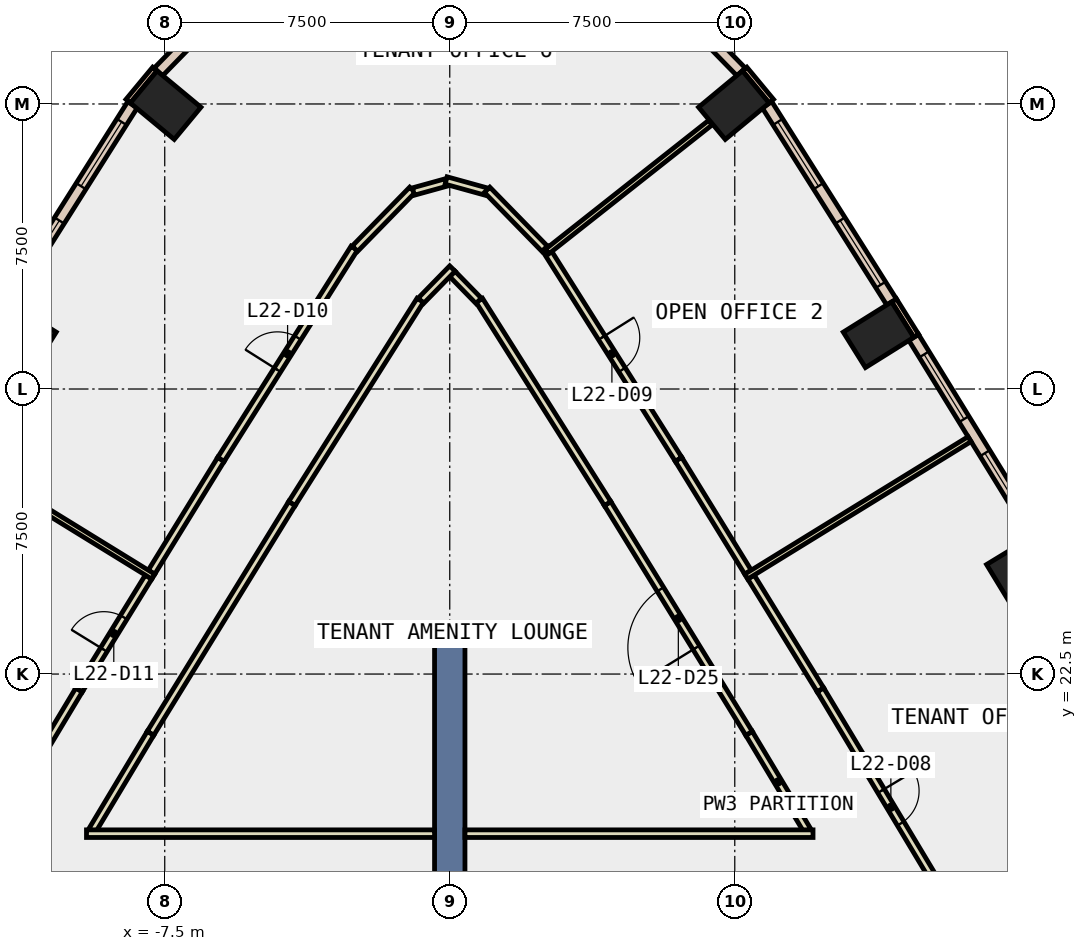
"""IFC4 building model, lengths in metres.
Left out: names, types, materials, properties, quantities, classifications, styles, units other than length and angle.
Written with IfcOpenShell. Run it as: python <this file> out.ifc"""

import sys

from ifc_helpers import new_model, si_unit, direction, frame, frame_2d, origin, origin_2d, place, context, subcontext, project, spatial, rectangle, extrude, element, fill, save


model = new_model("IFC4")
c1 = context("Model", 3, precision=1e-05, world=origin(), true_north=direction((0.0, 1.0)))
c2 = subcontext(c1, "Body", "Model", "MODEL_VIEW")
j1 = project(units=[si_unit("LENGTHUNIT", "METRE"), si_unit("PLANEANGLEUNIT", "RADIAN")], contexts=[c1])
p1 = place(None, origin())
s1 = spatial("IfcSite", under=j1, at=p1, CompositionType="ELEMENT")
p2 = place(p1, origin())
s2 = spatial("IfcBuilding", under=s1, at=p2, CompositionType="ELEMENT")
p3 = place(p2, frame((0.0, 0.0, 103.4)))
s3 = spatial("IfcBuildingStorey", under=s2, at=p3, CompositionType="ELEMENT", Elevation=103.4)
for number, where, z_axis, x_axis in (
    (1, (15.053, 25.302, -0.4), (0.0, 0.0, 1.0), (-0.52, 0.854, 0.0)),
    (2, (11.283, 31.428, -0.4), (0.0, 0.0, 1.0), (-0.53, 0.848, 0.0)),
    (3, (7.476, 37.47, -0.4), (0.0, 0.0, 1.0), (-0.638, 0.77, 0.0)),
    (4, (-7.476, 37.47, -0.4), (0.0, 0.0, 1.0), (0.638, 0.77, 0.0)),
    (5, (-11.283, 31.428, -0.4), (0.0, 0.0, 1.0), (0.53, 0.848, 0.0)),
):
    element("IfcColumn", number, at=place(p3, frame(where, z_axis=z_axis, x_axis=x_axis)), inside=s3, PredefinedType="COLUMN", context=c2, shape_type="SweptSolid", body=[
        extrude(rectangle(XDim=1.1, YDim=1.5, at=origin_2d()), origin(), (0.0, 0.0, 1.0), 4.2),
    ])
p4 = place(p3, frame((0.0, 14.5, -0.4), z_axis=(0.0, 0.0, 1.0), x_axis=(0.0, 1.0, 0.0)))
e6 = element("IfcWall", 6, at=p4, inside=s3, PredefinedType="SHEAR", context=c2, shape_type="SweptSolid", body=[
    extrude(rectangle(XDim=9.0, YDim=0.8, at=frame_2d((4.5, 0.0))), origin(), (0.0, 0.0, 1.0), 4.2),
])
p5 = place(p3, frame((12.274, 31.399, 0.0), z_axis=(0.0, 0.0, 1.0), x_axis=(-0.529879262372, 0.848073090782, 0.0)))
e7 = element("IfcWall", 7, at=p5, inside=s3, PredefinedType="STANDARD", context=c2, shape_type="SweptSolid", body=[
    extrude(rectangle(XDim=1.1, YDim=0.15, at=frame_2d((0.55, 0.0))), origin(), (0.0, 0.0, 1.0), 3.8),
])
for number, where, z_axis, x_axis in (
    (8, (8.462, 37.574, 0.0), (0.0, 0.0, 1.0), (-0.639, 0.77, 0.0)),
    (9, (-7.76, 38.42, 0.0), (0.0, 0.0, 1.0), (-0.639, -0.77, 0.0)),
):
    element("IfcWall", number, at=place(p3, frame(where, z_axis=z_axis, x_axis=x_axis)), inside=s3, PredefinedType="STANDARD", context=c2, shape_type="SweptSolid", body=[
        extrude(rectangle(XDim=1.099, YDim=0.15, at=frame_2d((0.55, 0.0))), origin(), (0.0, 0.0, 1.0), 3.8),
    ])
p6 = place(p3, frame((15.406, 26.16, 0.0), z_axis=(0.0, 0.0, 1.0), x_axis=(-0.524121974895, 0.851643208998, 0.0)))
e10 = element("IfcWall", 10, at=p6, inside=s3, PredefinedType="STANDARD", context=c2, shape_type="SweptSolid", body=[
    extrude(rectangle(XDim=6.104, YDim=0.3, at=frame_2d((3.052, 0.0))), origin(), (0.0, 0.0, 1.0), 3.8),
])
p7 = place(p6, frame((0.526, 0.0, 0.9)))
e11 = element("IfcOpeningElement", 11, at=p7, cuts=e10, PredefinedType="OPENING", context=c2, shape_type="SweptSolid", body=[
    extrude(rectangle(XDim=2.0, YDim=2.6, at=frame_2d((1.0, 1.3))), frame((0.0, 0.16, 0.0), z_axis=(0.0, -1.0, 0.0), x_axis=(1.0, 0.0, 0.0)), (0.0, 0.0, 1.0), 0.32),
])
p8 = place(p6, frame((3.578, 0.0, 0.9)))
e12 = element("IfcOpeningElement", 12, at=p8, cuts=e10, PredefinedType="OPENING", context=c2, shape_type="SweptSolid", body=[
    extrude(rectangle(XDim=2.0, YDim=2.6, at=frame_2d((1.0, 1.3))), frame((0.0, 0.16, 0.0), z_axis=(0.0, -1.0, 0.0), x_axis=(1.0, 0.0, 0.0)), (0.0, 0.0, 1.0), 0.32),
])
p9 = place(p3, frame((11.626, 32.29, 0.0), z_axis=(0.0, 0.0, 1.0), x_axis=(-0.534018429465, 0.845472836342, 0.0)))
e13 = element("IfcWall", 13, at=p9, inside=s3, PredefinedType="STANDARD", context=c2, shape_type="SweptSolid", body=[
    extrude(rectangle(XDim=6.138, YDim=0.3, at=frame_2d((3.069, 0.0))), origin(), (0.0, 0.0, 1.0), 3.8),
])
p10 = place(p9, frame((0.535, 0.0, 0.9)))
e14 = element("IfcOpeningElement", 14, at=p10, cuts=e13, PredefinedType="OPENING", context=c2, shape_type="SweptSolid", body=[
    extrude(rectangle(XDim=2.0, YDim=2.6, at=frame_2d((1.0, 1.3))), frame((0.0, 0.16, 0.0), z_axis=(0.0, -1.0, 0.0), x_axis=(1.0, 0.0, 0.0)), (0.0, 0.0, 1.0), 0.32),
])
p11 = place(p9, frame((3.604, 0.0, 0.9)))
e15 = element("IfcOpeningElement", 15, at=p11, cuts=e13, PredefinedType="OPENING", context=c2, shape_type="SweptSolid", body=[
    extrude(rectangle(XDim=2.0, YDim=2.6, at=frame_2d((1.0, 1.3))), frame((0.0, 0.16, 0.0), z_axis=(0.0, -1.0, 0.0), x_axis=(1.0, 0.0, 0.0)), (0.0, 0.0, 1.0), 0.32),
])
p12 = place(p3, frame((7.668, 38.343, 0.0), z_axis=(0.0, 0.0, 1.0), x_axis=(-0.698695735804, 0.715418946331, 0.0)))
e16 = element("IfcWall", 16, at=p12, inside=s3, PredefinedType="STANDARD", context=c2, shape_type="SweptSolid", body=[
    extrude(rectangle(XDim=3.65, YDim=0.3, at=frame_2d((1.825, 0.0))), origin(), (0.0, 0.0, 1.0), 3.8),
])
p13 = place(p12, frame((1.125, 0.0, 0.9)))
e17 = element("IfcOpeningElement", 17, at=p13, cuts=e16, PredefinedType="OPENING", context=c2, shape_type="SweptSolid", body=[
    extrude(rectangle(XDim=1.4, YDim=2.6, at=frame_2d((0.7, 1.3))), frame((0.0, 0.16, 0.0), z_axis=(0.0, -1.0, 0.0), x_axis=(1.0, 0.0, 0.0)), (0.0, 0.0, 1.0), 0.32),
])
p14 = place(p3, frame((-5.118, 40.954, 0.0), z_axis=(0.0, 0.0, 1.0), x_axis=(-0.698695735804, -0.715418946331, 0.0)))
e18 = element("IfcWall", 18, at=p14, inside=s3, PredefinedType="STANDARD", context=c2, shape_type="SweptSolid", body=[
    extrude(rectangle(XDim=3.65, YDim=0.3, at=frame_2d((1.825, 0.0))), origin(), (0.0, 0.0, 1.0), 3.8),
])
p15 = place(p14, frame((1.125, 0.0, 0.9)))
e19 = element("IfcOpeningElement", 19, at=p15, cuts=e18, PredefinedType="OPENING", context=c2, shape_type="SweptSolid", body=[
    extrude(rectangle(XDim=1.4, YDim=2.6, at=frame_2d((0.7, 1.3))), frame((0.0, 0.16, 0.0), z_axis=(0.0, -1.0, 0.0), x_axis=(1.0, 0.0, 0.0)), (0.0, 0.0, 1.0), 0.32),
])
p16 = place(p3, frame((-8.348, 37.48, 0.0), z_axis=(0.0, 0.0, 1.0), x_axis=(-0.534018429465, -0.845472836342, 0.0)))
e20 = element("IfcWall", 20, at=p16, inside=s3, PredefinedType="STANDARD", context=c2, shape_type="SweptSolid", body=[
    extrude(rectangle(XDim=6.138, YDim=0.3, at=frame_2d((3.069, 0.0))), origin(), (0.0, 0.0, 1.0), 3.8),
])
p17 = place(p16, frame((0.535, 0.0, 0.9)))
e21 = element("IfcOpeningElement", 21, at=p17, cuts=e20, PredefinedType="OPENING", context=c2, shape_type="SweptSolid", body=[
    extrude(rectangle(XDim=2.0, YDim=2.6, at=frame_2d((1.0, 1.3))), frame((0.0, 0.16, 0.0), z_axis=(0.0, -1.0, 0.0), x_axis=(1.0, 0.0, 0.0)), (0.0, 0.0, 1.0), 0.32),
])
p18 = place(p16, frame((3.604, 0.0, 0.9)))
e22 = element("IfcOpeningElement", 22, at=p18, cuts=e20, PredefinedType="OPENING", context=c2, shape_type="SweptSolid", body=[
    extrude(rectangle(XDim=2.0, YDim=2.6, at=frame_2d((1.0, 1.3))), frame((0.0, 0.16, 0.0), z_axis=(0.0, -1.0, 0.0), x_axis=(1.0, 0.0, 0.0)), (0.0, 0.0, 1.0), 0.32),
])
p19 = place(p3, frame((9.407, 18.386, 0.0), z_axis=(0.0, 0.0, 1.0), x_axis=(-0.514399309837, 0.857550785691, 0.0)))
e23 = element("IfcWall", 23, at=p19, inside=s3, PredefinedType="PARTITIONING", context=c2, shape_type="SweptSolid", body=[
    extrude(rectangle(XDim=2.978, YDim=0.2, at=frame_2d((1.489, 0.0))), origin(), (0.0, 0.0, 1.0), 3.8),
])
p20 = place(p3, frame((7.875, 20.94, 0.0), z_axis=(0.0, 0.0, 1.0), x_axis=(-0.524183774504, 0.851605172921, 0.0)))
e24 = element("IfcWall", 24, at=p20, inside=s3, PredefinedType="PARTITIONING", context=c2, shape_type="SweptSolid", body=[
    extrude(rectangle(XDim=7.099, YDim=0.2, at=frame_2d((3.549, 0.0))), origin(), (0.0, 0.0, 1.0), 3.8),
])
p21 = place(p20, frame((2.649, 0.0, 0.0)))
e25 = element("IfcOpeningElement", 25, at=p21, cuts=e24, PredefinedType="OPENING", context=c2, shape_type="SweptSolid", body=[
    extrude(rectangle(XDim=1.8, YDim=2.1, at=frame_2d((0.9, 1.05))), frame((0.0, 0.11, 0.0), z_axis=(0.0, -1.0, 0.0), x_axis=(1.0, 0.0, 0.0)), (0.0, 0.0, 1.0), 0.22),
])
p22 = place(p3, frame((4.154, 26.985, 0.0), z_axis=(0.0, 0.0, 1.0), x_axis=(-0.53384777413, 0.84558060175, 0.0)))
e26 = element("IfcWall", 26, at=p22, inside=s3, PredefinedType="PARTITIONING", context=c2, shape_type="SweptSolid", body=[
    extrude(rectangle(XDim=6.326, YDim=0.2, at=frame_2d((3.163, 0.0))), origin(), (0.0, 0.0, 1.0), 3.8),
])
p23 = place(p3, frame((0.76, 32.321, 0.0), z_axis=(0.0, 0.0, 1.0), x_axis=(-0.698898447714, 0.715220916769, 0.0)))
e27 = element("IfcWall", 27, at=p23, inside=s3, PredefinedType="PARTITIONING", context=c2, shape_type="SweptSolid", body=[
    extrude(rectangle(XDim=0.987, YDim=0.2, at=frame_2d((0.494, 0.0))), origin(), (0.0, 0.0, 1.0), 3.8),
])
p24 = place(p3, frame((0.07, 33.17, 0.0), z_axis=(0.0, 0.0, 1.0), x_axis=(-0.699145664909, -0.714979257908, 0.0)))
e28 = element("IfcWall", 28, at=p24, inside=s3, PredefinedType="PARTITIONING", context=c2, shape_type="SweptSolid", body=[
    extrude(rectangle(XDim=1.187, YDim=0.2, at=frame_2d((0.594, 0.0))), origin(), (0.0, 0.0, 1.0), 3.8),
])
p25 = place(p3, frame((-0.777, 32.334, 0.0), z_axis=(0.0, 0.0, 1.0), x_axis=(-0.53384777413, -0.84558060175, 0.0)))
e29 = element("IfcWall", 29, at=p25, inside=s3, PredefinedType="PARTITIONING", context=c2, shape_type="SweptSolid", body=[
    extrude(rectangle(XDim=6.326, YDim=0.2, at=frame_2d((3.163, 0.0))), origin(), (0.0, 0.0, 1.0), 3.8),
])
p26 = place(p3, frame((-4.154, 26.985, 0.0), z_axis=(0.0, 0.0, 1.0), x_axis=(-0.524183774504, -0.851605172921, 0.0)))
e30 = element("IfcWall", 30, at=p26, inside=s3, PredefinedType="PARTITIONING", context=c2, shape_type="SweptSolid", body=[
    extrude(rectangle(XDim=7.099, YDim=0.2, at=frame_2d((3.549, 0.0))), origin(), (0.0, 0.0, 1.0), 3.8),
])
p27 = place(p3, frame((-7.875, 20.94, 0.0), z_axis=(0.0, 0.0, 1.0), x_axis=(-0.514399309837, -0.857550785691, 0.0)))
e31 = element("IfcWall", 31, at=p27, inside=s3, PredefinedType="PARTITIONING", context=c2, shape_type="SweptSolid", body=[
    extrude(rectangle(XDim=2.978, YDim=0.2, at=frame_2d((1.489, 0.0))), origin(), (0.0, 0.0, 1.0), 3.8),
])
p28 = place(p3, frame((7.927, 25.052, 0.0), z_axis=(0.0, 0.0, 1.0), x_axis=(0.524140390501, -0.851631875311, 0.0)))
e32 = element("IfcWall", 32, at=p28, inside=s3, PredefinedType="PARTITIONING", context=c2, shape_type="SweptSolid", body=[
    extrude(rectangle(XDim=3.487, YDim=0.2, at=frame_2d((1.744, 0.0))), origin(), (0.0, 0.0, 1.0), 3.8),
])
p29 = place(p3, frame((9.755, 22.082, 0.0), z_axis=(0.0, 0.0, 1.0), x_axis=(0.514582342012, -0.857440967816, 0.0)))
e33 = element("IfcWall", 33, at=p29, inside=s3, PredefinedType="PARTITIONING", context=c2, shape_type="SweptSolid", body=[
    extrude(rectangle(XDim=7.049, YDim=0.2, at=frame_2d((3.524, 0.0))), origin(), (0.0, 0.0, 1.0), 3.8),
])
p30 = place(p29, frame((3.1, 0.0, 0.0)))
e34 = element("IfcOpeningElement", 34, at=p30, cuts=e33, PredefinedType="OPENING", context=c2, shape_type="SweptSolid", body=[
    extrude(rectangle(XDim=1.0, YDim=2.1, at=frame_2d((0.5, 1.05))), frame((0.0, 0.11, 0.0), z_axis=(0.0, -1.0, 0.0), x_axis=(1.0, 0.0, 0.0)), (0.0, 0.0, 1.0), 0.22),
])
p31 = place(p3, frame((2.513, 33.705, 0.0), z_axis=(0.0, 0.0, 1.0), x_axis=(0.533874165031, -0.845563939577, 0.0)))
e35 = element("IfcWall", 35, at=p31, inside=s3, PredefinedType="PARTITIONING", context=c2, shape_type="SweptSolid", body=[
    extrude(rectangle(XDim=6.571, YDim=0.2, at=frame_2d((3.286, 0.0))), origin(), (0.0, 0.0, 1.0), 3.8),
])
p32 = place(p31, frame((2.785, 0.0, 0.0)))
e36 = element("IfcOpeningElement", 36, at=p32, cuts=e35, PredefinedType="OPENING", context=c2, shape_type="SweptSolid", body=[
    extrude(rectangle(XDim=1.0, YDim=2.1, at=frame_2d((0.5, 1.05))), frame((0.0, 0.11, 0.0), z_axis=(0.0, -1.0, 0.0), x_axis=(1.0, 0.0, 0.0)), (0.0, 0.0, 1.0), 0.22),
])
for number, where, z_axis, x_axis in (
    (37, (6.021, 28.149, 0.0), (0.0, 0.0, 1.0), (0.524, -0.852, 0.0)),
    (38, (-7.848, 25.18, 0.0), (0.0, 0.0, 1.0), (0.524, 0.852, 0.0)),
):
    element("IfcWall", number, at=place(p3, frame(where, z_axis=z_axis, x_axis=x_axis)), inside=s3, PredefinedType="PARTITIONING", context=c2, shape_type="SweptSolid", body=[
        extrude(rectangle(XDim=3.486, YDim=0.2, at=frame_2d((1.743, 0.0))), origin(), (0.0, 0.0, 1.0), 3.8),
    ])
p33 = place(p3, frame((-6.021, 28.149, 0.0), z_axis=(0.0, 0.0, 1.0), x_axis=(0.533874165031, 0.845563939577, 0.0)))
e39 = element("IfcWall", 39, at=p33, inside=s3, PredefinedType="PARTITIONING", context=c2, shape_type="SweptSolid", body=[
    extrude(rectangle(XDim=6.571, YDim=0.2, at=frame_2d((3.286, 0.0))), origin(), (0.0, 0.0, 1.0), 3.8),
])
p34 = place(p33, frame((2.785, 0.0, 0.0)))
e40 = element("IfcOpeningElement", 40, at=p34, cuts=e39, PredefinedType="OPENING", context=c2, shape_type="SweptSolid", body=[
    extrude(rectangle(XDim=1.0, YDim=2.1, at=frame_2d((0.5, 1.05))), frame((0.0, 0.11, 0.0), z_axis=(0.0, -1.0, 0.0), x_axis=(1.0, 0.0, 0.0)), (0.0, 0.0, 1.0), 0.22),
])
p35 = place(p3, frame((-2.496, 33.692, 0.0), z_axis=(0.0, 0.0, 1.0), x_axis=(0.698771726105, 0.715344724449, 0.0)))
e41 = element("IfcWall", 41, at=p35, inside=s3, PredefinedType="PARTITIONING", context=c2, shape_type="SweptSolid", body=[
    extrude(rectangle(XDim=2.166, YDim=0.2, at=frame_2d((1.083, 0.0))), origin(), (0.0, 0.0, 1.0), 3.8),
])
p36 = place(p3, frame((-0.956, 35.196, 0.0), z_axis=(0.0, 0.0, 1.0), x_axis=(0.963772226389, 0.266726630919, 0.0)))
e42 = element("IfcWall", 42, at=p36, inside=s3, PredefinedType="PARTITIONING", context=c2, shape_type="SweptSolid", body=[
    extrude(rectangle(XDim=0.892, YDim=0.2, at=frame_2d((0.446, 0.0))), origin(), (0.0, 0.0, 1.0), 3.8),
])
p37 = place(p3, frame((-0.096, 35.487, 0.0), z_axis=(0.0, 0.0, 1.0), x_axis=(0.963802560401, -0.266616999767, 0.0)))
e43 = element("IfcWall", 43, at=p37, inside=s3, PredefinedType="PARTITIONING", context=c2, shape_type="SweptSolid", body=[
    extrude(rectangle(XDim=1.092, YDim=0.2, at=frame_2d((0.546, 0.0))), origin(), (0.0, 0.0, 1.0), 3.8),
])
p38 = place(p3, frame((0.983, 35.241, 0.0), z_axis=(0.0, 0.0, 1.0), x_axis=(0.698771726105, -0.715344724449, 0.0)))
e44 = element("IfcWall", 44, at=p38, inside=s3, PredefinedType="PARTITIONING", context=c2, shape_type="SweptSolid", body=[
    extrude(rectangle(XDim=2.166, YDim=0.2, at=frame_2d((1.083, 0.0))), origin(), (0.0, 0.0, 1.0), 3.8),
])
p39 = place(p3, frame((-11.549, 19.092, 0.0), z_axis=(0.0, 0.0, 1.0), x_axis=(0.514536939864, 0.857468213705, 0.0)))
e45 = element("IfcWall", 45, at=p39, inside=s3, PredefinedType="PARTITIONING", context=c2, shape_type="SweptSolid", body=[
    extrude(rectangle(XDim=3.487, YDim=0.2, at=frame_2d((1.744, 0.0))), origin(), (0.0, 0.0, 1.0), 3.8),
])
p40 = place(p3, frame((-9.755, 22.082, 0.0), z_axis=(0.0, 0.0, 1.0), x_axis=(0.524140390501, 0.851631875311, 0.0)))
e46 = element("IfcWall", 46, at=p40, inside=s3, PredefinedType="PARTITIONING", context=c2, shape_type="SweptSolid", body=[
    extrude(rectangle(XDim=3.487, YDim=0.2, at=frame_2d((1.744, 0.0))), origin(), (0.0, 0.0, 1.0), 3.8),
])
p41 = place(p40, frame((1.244, 0.0, 0.0)))
e47 = element("IfcOpeningElement", 47, at=p41, cuts=e46, PredefinedType="OPENING", context=c2, shape_type="SweptSolid", body=[
    extrude(rectangle(XDim=1.0, YDim=2.1, at=frame_2d((0.5, 1.05))), frame((0.0, 0.11, 0.0), z_axis=(0.0, -1.0, 0.0), x_axis=(1.0, 0.0, 0.0)), (0.0, 0.0, 1.0), 0.22),
])
p42 = place(p3, frame((-9.559, 18.3, 0.0), z_axis=(0.0, 0.0, 1.0), x_axis=(1.0, 0.0, 0.0)))
e48 = element("IfcWall", 48, at=p42, inside=s3, PredefinedType="PARTITIONING", context=c2, shape_type="SweptSolid", body=[
    extrude(rectangle(XDim=9.159, YDim=0.2, at=frame_2d((4.58, 0.0))), origin(), (0.0, 0.0, 1.0), 3.8),
])
p43 = place(p3, frame((13.507, 16.025, 0.0), z_axis=(0.0, 0.0, 1.0), x_axis=(0.860289301319, 0.509806157315, 0.0)))
e49 = element("IfcWall", 49, at=p43, inside=s3, PredefinedType="PARTITIONING", context=c2, shape_type="SweptSolid", body=[
    extrude(rectangle(XDim=5.33, YDim=0.15, at=frame_2d((2.665, 0.0))), origin(), (0.0, 0.0, 1.0), 3.8),
])
p44 = place(p3, frame((7.802, 25.064, 0.0), z_axis=(0.0, 0.0, 1.0), x_axis=(0.851596352662, 0.524198103901, 0.0)))
e50 = element("IfcWall", 50, at=p44, inside=s3, PredefinedType="PARTITIONING", context=c2, shape_type="SweptSolid", body=[
    extrude(rectangle(XDim=6.9, YDim=0.15, at=frame_2d((3.45, 0.0))), origin(), (0.0, 0.0, 1.0), 3.8),
])
p45 = place(p3, frame((2.566, 33.62, 0.0), z_axis=(0.0, 0.0, 1.0), x_axis=(0.784838195876, 0.619700739304, 0.0)))
e51 = element("IfcWall", 51, at=p45, inside=s3, PredefinedType="PARTITIONING", context=c2, shape_type="SweptSolid", body=[
    extrude(rectangle(XDim=5.469, YDim=0.15, at=frame_2d((2.734, 0.0))), origin(), (0.0, 0.0, 1.0), 3.8),
])
p46 = place(p3, frame((-7.802, 25.064, 0.0), z_axis=(0.0, 0.0, 1.0), x_axis=(-0.851596352662, 0.524198103901, 0.0)))
e52 = element("IfcWall", 52, at=p46, inside=s3, PredefinedType="PARTITIONING", context=c2, shape_type="SweptSolid", body=[
    extrude(rectangle(XDim=6.9, YDim=0.15, at=frame_2d((3.45, 0.0))), origin(), (0.0, 0.0, 1.0), 3.8),
])
p47 = place(p3, frame((0.4, 18.3, 0.0), z_axis=(0.0, 0.0, 1.0), x_axis=(1.0, 0.0, 0.0)))
e53 = element("IfcWall", 53, at=p47, inside=s3, PredefinedType="PARTITIONING", context=c2, shape_type="SweptSolid", body=[
    extrude(rectangle(XDim=9.159, YDim=0.2, at=frame_2d((4.58, 0.0))), origin(), (0.0, 0.0, 1.0), 3.8),
])
p48 = place(p7, origin())
e54 = element("IfcWindow", 54, at=p48, inside=s3, PartitioningType="SINGLE_PANEL", PredefinedType="WINDOW", context=c2, shape_type="SweptSolid", body=[
    extrude(rectangle(XDim=2.0, YDim=2.6, at=frame_2d((1.0, 1.3))), frame((0.0, 0.03, 0.0), z_axis=(0.0, -1.0, 0.0), x_axis=(1.0, 0.0, 0.0)), (0.0, 0.0, 1.0), 0.06),
])
fill(e11, e54)
p49 = place(p8, origin())
e55 = element("IfcWindow", 55, at=p49, inside=s3, PartitioningType="SINGLE_PANEL", PredefinedType="WINDOW", context=c2, shape_type="SweptSolid", body=[
    extrude(rectangle(XDim=2.0, YDim=2.6, at=frame_2d((1.0, 1.3))), frame((0.0, 0.03, 0.0), z_axis=(0.0, -1.0, 0.0), x_axis=(1.0, 0.0, 0.0)), (0.0, 0.0, 1.0), 0.06),
])
fill(e12, e55)
p50 = place(p10, origin())
e56 = element("IfcWindow", 56, at=p50, inside=s3, PartitioningType="SINGLE_PANEL", PredefinedType="WINDOW", context=c2, shape_type="SweptSolid", body=[
    extrude(rectangle(XDim=2.0, YDim=2.6, at=frame_2d((1.0, 1.3))), frame((0.0, 0.03, 0.0), z_axis=(0.0, -1.0, 0.0), x_axis=(1.0, 0.0, 0.0)), (0.0, 0.0, 1.0), 0.06),
])
fill(e14, e56)
p51 = place(p11, origin())
e57 = element("IfcWindow", 57, at=p51, inside=s3, PartitioningType="SINGLE_PANEL", PredefinedType="WINDOW", context=c2, shape_type="SweptSolid", body=[
    extrude(rectangle(XDim=2.0, YDim=2.6, at=frame_2d((1.0, 1.3))), frame((0.0, 0.03, 0.0), z_axis=(0.0, -1.0, 0.0), x_axis=(1.0, 0.0, 0.0)), (0.0, 0.0, 1.0), 0.06),
])
fill(e15, e57)
p52 = place(p17, origin())
e58 = element("IfcWindow", 58, at=p52, inside=s3, PartitioningType="SINGLE_PANEL", PredefinedType="WINDOW", context=c2, shape_type="SweptSolid", body=[
    extrude(rectangle(XDim=2.0, YDim=2.6, at=frame_2d((1.0, 1.3))), frame((0.0, 0.03, 0.0), z_axis=(0.0, -1.0, 0.0), x_axis=(1.0, 0.0, 0.0)), (0.0, 0.0, 1.0), 0.06),
])
fill(e21, e58)
p53 = place(p18, origin())
e59 = element("IfcWindow", 59, at=p53, inside=s3, PartitioningType="SINGLE_PANEL", PredefinedType="WINDOW", context=c2, shape_type="SweptSolid", body=[
    extrude(rectangle(XDim=2.0, YDim=2.6, at=frame_2d((1.0, 1.3))), frame((0.0, 0.03, 0.0), z_axis=(0.0, -1.0, 0.0), x_axis=(1.0, 0.0, 0.0)), (0.0, 0.0, 1.0), 0.06),
])
fill(e22, e59)
p54 = place(p30, origin())
e60 = element("IfcDoor", 60, at=p54, inside=s3, OperationType="SINGLE_SWING_LEFT", PredefinedType="DOOR", context=c2, shape_type="SweptSolid", body=[
    extrude(rectangle(XDim=1.0, YDim=2.1, at=frame_2d((0.5, 1.05))), frame((0.0, 0.025, 0.0), z_axis=(0.0, -1.0, 0.0), x_axis=(1.0, 0.0, 0.0)), (0.0, 0.0, 1.0), 0.05),
])
fill(e34, e60)
p55 = place(p32, origin())
e61 = element("IfcDoor", 61, at=p55, inside=s3, OperationType="SINGLE_SWING_LEFT", PredefinedType="DOOR", context=c2, shape_type="SweptSolid", body=[
    extrude(rectangle(XDim=1.0, YDim=2.1, at=frame_2d((0.5, 1.05))), frame((0.0, 0.025, 0.0), z_axis=(0.0, -1.0, 0.0), x_axis=(1.0, 0.0, 0.0)), (0.0, 0.0, 1.0), 0.05),
])
fill(e36, e61)
p56 = place(p34, origin())
e62 = element("IfcDoor", 62, at=p56, inside=s3, OperationType="SINGLE_SWING_LEFT", PredefinedType="DOOR", context=c2, shape_type="SweptSolid", body=[
    extrude(rectangle(XDim=1.0, YDim=2.1, at=frame_2d((0.5, 1.05))), frame((0.0, 0.025, 0.0), z_axis=(0.0, -1.0, 0.0), x_axis=(1.0, 0.0, 0.0)), (0.0, 0.0, 1.0), 0.05),
])
fill(e40, e62)
p57 = place(p41, origin())
e63 = element("IfcDoor", 63, at=p57, inside=s3, OperationType="SINGLE_SWING_LEFT", PredefinedType="DOOR", context=c2, shape_type="SweptSolid", body=[
    extrude(rectangle(XDim=1.0, YDim=2.1, at=frame_2d((0.5, 1.05))), frame((0.0, 0.025, 0.0), z_axis=(0.0, -1.0, 0.0), x_axis=(1.0, 0.0, 0.0)), (0.0, 0.0, 1.0), 0.05),
])
fill(e47, e63)
p58 = place(p21, origin())
e64 = element("IfcDoor", 64, at=p58, inside=s3, OperationType="DOUBLE_DOOR_SINGLE_SWING", PredefinedType="DOOR", context=c2, shape_type="SweptSolid", body=[
    extrude(rectangle(XDim=1.8, YDim=2.1, at=frame_2d((0.9, 1.05))), frame((0.0, 0.025, 0.0), z_axis=(0.0, -1.0, 0.0), x_axis=(1.0, 0.0, 0.0)), (0.0, 0.0, 1.0), 0.05),
])
fill(e25, e64)
save(model, sys.argv[1])
